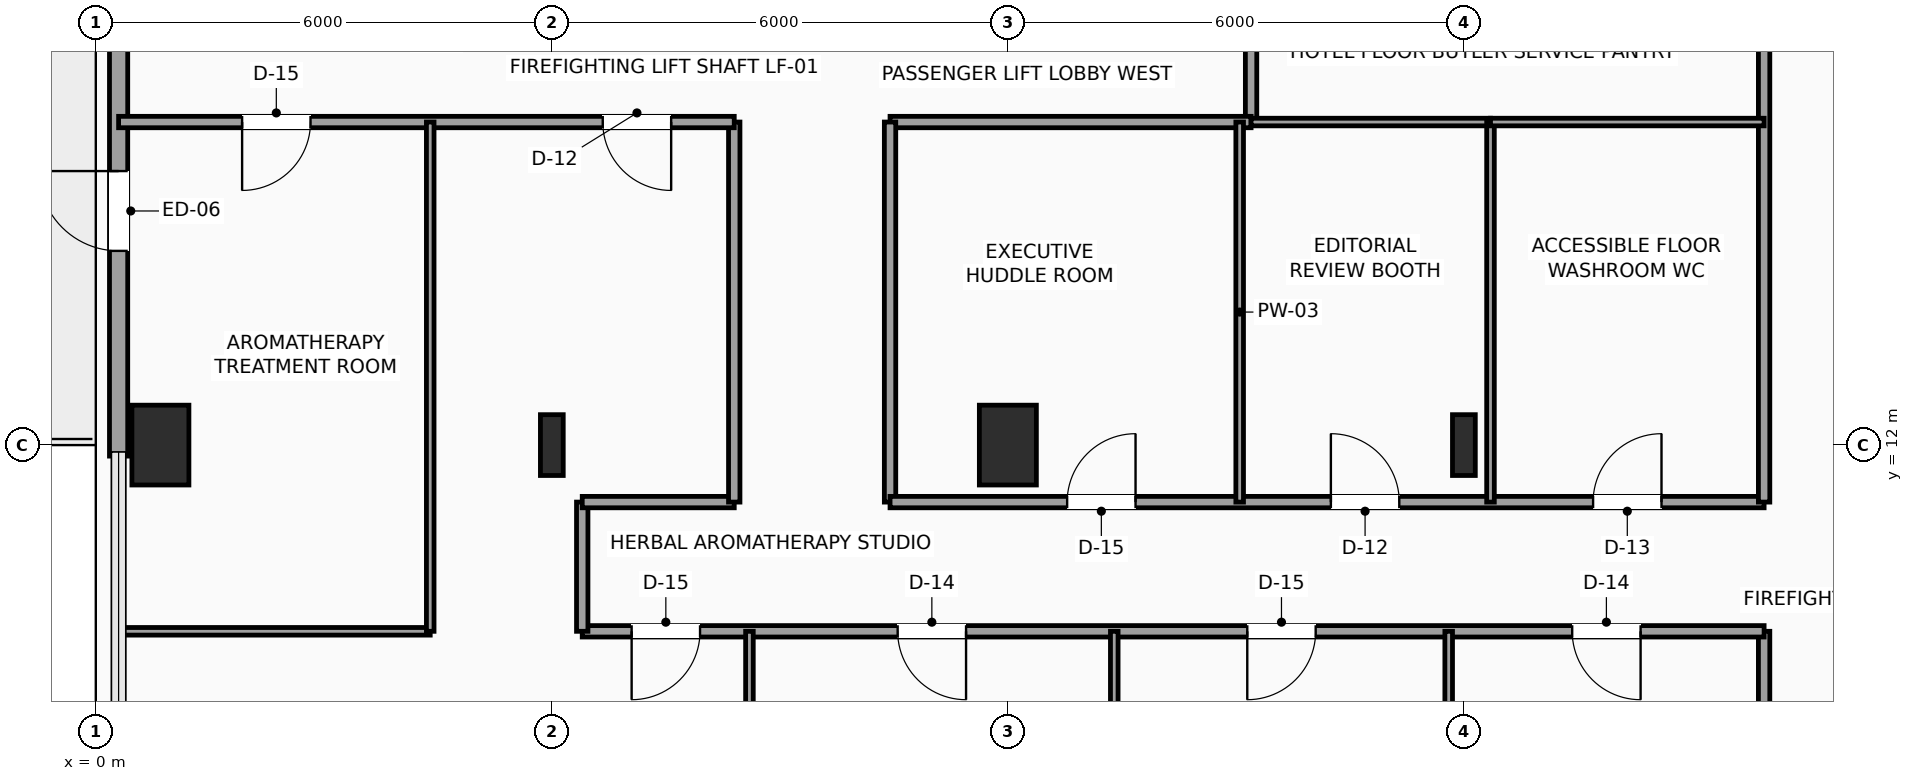
"""IFC4 building model, lengths in metres.
Left out: names, types, materials, properties, quantities, classifications, styles, units other than length and angle.
Written with IfcOpenShell. Run it as: python <this file> out.ifc"""

import sys

from ifc_helpers import new_model, si_unit, direction, frame, frame_2d, origin, origin_2d, place, context, subcontext, project, spatial, rectangle, i_section, extrude, element, fill, save


model = new_model("IFC4")
c1 = context("Model", 3, precision=1e-05, world=origin(), true_north=direction((0.0, 1.0)))
c2 = subcontext(c1, "Body", "Model", "MODEL_VIEW")
j1 = project(units=[si_unit("LENGTHUNIT", "METRE"), si_unit("PLANEANGLEUNIT", "RADIAN")], contexts=[c1])
p1 = place(None, origin())
s1 = spatial("IfcSite", under=j1, at=p1, CompositionType="ELEMENT")
p2 = place(p1, origin())
s2 = spatial("IfcBuilding", under=s1, at=p2, CompositionType="ELEMENT")
p3 = place(p2, frame((0.0, 0.0, 191.7)))
s3 = spatial("IfcBuildingStorey", under=s2, at=p3, CompositionType="ELEMENT", Elevation=191.7)
p4 = place(p3, frame((0.85, 12.0, 0.0), z_axis=(0.0, 0.0, 1.0), x_axis=(1.0, 0.0, 0.0)))
e1 = element("IfcColumn", 1, at=p4, inside=s3, PredefinedType="COLUMN", context=c2, shape_type="SweptSolid", body=[
    extrude(rectangle(XDim=0.75, YDim=1.05, at=origin_2d()), origin(), (0.0, 0.0, 1.0), 3.75),
])
p5 = place(p3, frame((6.0, 12.0, 0.0), z_axis=(0.0, 0.0, 1.0), x_axis=(1.0, 0.0, 0.0)))
e2 = element("IfcColumn", 2, at=p5, inside=s3, PredefinedType="COLUMN", context=c2, shape_type="SweptSolid", body=[
    extrude(i_section(OverallWidth=0.3, OverallDepth=0.8, WebThickness=0.018, FlangeThickness=0.033, FilletRadius=0.03, at=origin_2d()), origin(), (0.0, 0.0, 1.0), 3.75),
])
p6 = place(p3, frame((12.0, 12.0, 0.0), z_axis=(0.0, 0.0, 1.0), x_axis=(1.0, 0.0, 0.0)))
e3 = element("IfcColumn", 3, at=p6, inside=s3, PredefinedType="COLUMN", context=c2, shape_type="SweptSolid", body=[
    extrude(rectangle(XDim=0.75, YDim=1.05, at=origin_2d()), origin(), (0.0, 0.0, 1.0), 3.75),
])
p7 = place(p3, frame((18.0, 12.0, 0.0), z_axis=(0.0, 0.0, 1.0), x_axis=(1.0, 0.0, 0.0)))
e4 = element("IfcColumn", 4, at=p7, inside=s3, PredefinedType="COLUMN", context=c2, shape_type="SweptSolid", body=[
    extrude(i_section(OverallWidth=0.3, OverallDepth=0.8, WebThickness=0.018, FlangeThickness=0.033, FilletRadius=0.03, at=origin_2d()), origin(), (0.0, 0.0, 1.0), 3.75),
])
p8 = place(p3, frame((0.3, 11.855, 0.0), z_axis=(0.0, 0.0, 1.0), x_axis=(0.0, 1.0, 0.0)))
e5 = element("IfcWall", 5, at=p8, inside=s3, PredefinedType="SOLIDWALL", context=c2, shape_type="SweptSolid", body=[
    extrude(rectangle(XDim=9.29, YDim=0.24, at=frame_2d((4.645, 0.0))), origin(), (0.0, 0.0, 1.0), 3.54),
])
p9 = place(p8, frame((2.7, 0.0, 0.0)))
e6 = element("IfcOpeningElement", 6, at=p9, cuts=e5, PredefinedType="OPENING", context=c2, shape_type="SweptSolid", body=[
    extrude(rectangle(XDim=1.05, YDim=2.2, at=frame_2d((0.525, 1.1))), frame((0.0, 0.13, 0.0), z_axis=(0.0, -1.0, 0.0), x_axis=(1.0, 0.0, 0.0)), (0.0, 0.0, 1.0), 0.26),
])
p10 = place(p3, frame((21.95, 5.8, 0.0), z_axis=(0.0, 0.0, 1.0), x_axis=(0.0, 1.0, 0.0)))
e7 = element("IfcWall", 7, at=p10, inside=s3, PredefinedType="PARTITIONING", context=c2, shape_type="SweptSolid", body=[
    extrude(rectangle(XDim=3.75, YDim=0.15, at=frame_2d((1.875, 0.0))), origin(), (0.0, 0.0, 1.0), 3.54),
])
p11 = place(p3, frame((21.95, 9.55, 0.0), z_axis=(0.0, 0.0, 1.0), x_axis=(-1.0, 0.0, 0.0)))
e8 = element("IfcWall", 8, at=p11, inside=s3, PredefinedType="PARTITIONING", context=c2, shape_type="SweptSolid", body=[
    extrude(rectangle(XDim=15.55, YDim=0.15, at=frame_2d((7.775, 0.0))), origin(), (0.0, 0.0, 1.0), 3.54),
])
p12 = place(p11, frame((14.0, 0.0, 0.0)))
e9 = element("IfcOpeningElement", 9, at=p12, cuts=e8, PredefinedType="OPENING", context=c2, shape_type="SweptSolid", body=[
    extrude(rectangle(XDim=0.9, YDim=2.1, at=frame_2d((0.45, 1.05))), frame((0.0, 0.085, 0.0), z_axis=(0.0, -1.0, 0.0), x_axis=(1.0, 0.0, 0.0)), (0.0, 0.0, 1.0), 0.17),
])
p13 = place(p11, frame((10.5, 0.0, 0.0)))
e10 = element("IfcOpeningElement", 10, at=p13, cuts=e8, PredefinedType="OPENING", context=c2, shape_type="SweptSolid", body=[
    extrude(rectangle(XDim=0.9, YDim=2.1, at=frame_2d((0.45, 1.05))), frame((0.0, 0.085, 0.0), z_axis=(0.0, -1.0, 0.0), x_axis=(1.0, 0.0, 0.0)), (0.0, 0.0, 1.0), 0.17),
])
p14 = place(p11, frame((5.9, 0.0, 0.0)))
e11 = element("IfcOpeningElement", 11, at=p14, cuts=e8, PredefinedType="OPENING", context=c2, shape_type="SweptSolid", body=[
    extrude(rectangle(XDim=0.9, YDim=2.1, at=frame_2d((0.45, 1.05))), frame((0.0, 0.085, 0.0), z_axis=(0.0, -1.0, 0.0), x_axis=(1.0, 0.0, 0.0)), (0.0, 0.0, 1.0), 0.17),
])
p15 = place(p11, frame((1.625, 0.0, 0.0)))
e12 = element("IfcOpeningElement", 12, at=p15, cuts=e8, PredefinedType="OPENING", context=c2, shape_type="SweptSolid", body=[
    extrude(rectangle(XDim=0.9, YDim=2.1, at=frame_2d((0.45, 1.05))), frame((0.0, 0.085, 0.0), z_axis=(0.0, -1.0, 0.0), x_axis=(1.0, 0.0, 0.0)), (0.0, 0.0, 1.0), 0.17),
])
p16 = place(p3, frame((6.4, 9.55, 0.0), z_axis=(0.0, 0.0, 1.0), x_axis=(0.0, 1.0, 0.0)))
e13 = element("IfcWall", 13, at=p16, inside=s3, PredefinedType="PARTITIONING", context=c2, shape_type="SweptSolid", body=[
    extrude(rectangle(XDim=1.7, YDim=0.15, at=frame_2d((0.85, 0.0))), origin(), (0.0, 0.0, 1.0), 3.54),
])
p17 = place(p3, frame((6.4, 11.25, 0.0), z_axis=(0.0, 0.0, 1.0), x_axis=(1.0, 0.0, 0.0)))
e14 = element("IfcWall", 14, at=p17, inside=s3, PredefinedType="PARTITIONING", context=c2, shape_type="SweptSolid", body=[
    extrude(rectangle(XDim=2.0, YDim=0.15, at=frame_2d((1.0, 0.0))), origin(), (0.0, 0.0, 1.0), 3.54),
])
p18 = place(p3, frame((8.4, 11.25, 0.0), z_axis=(0.0, 0.0, 1.0), x_axis=(0.0, 1.0, 0.0)))
e15 = element("IfcWall", 15, at=p18, inside=s3, PredefinedType="PARTITIONING", context=c2, shape_type="SweptSolid", body=[
    extrude(rectangle(XDim=5.0, YDim=0.15, at=frame_2d((2.5, 0.0))), origin(), (0.0, 0.0, 1.0), 3.54),
])
p19 = place(p3, frame((8.4, 16.25, 0.0), z_axis=(0.0, 0.0, 1.0), x_axis=(-1.0, 0.0, 0.0)))
e16 = element("IfcWall", 16, at=p19, inside=s3, PredefinedType="PARTITIONING", context=c2, shape_type="SweptSolid", body=[
    extrude(rectangle(XDim=8.1, YDim=0.15, at=frame_2d((4.05, 0.0))), origin(), (0.0, 0.0, 1.0), 3.54),
])
p20 = place(p19, frame((5.575, 0.0, 0.0)))
e17 = element("IfcOpeningElement", 17, at=p20, cuts=e16, PredefinedType="OPENING", context=c2, shape_type="SweptSolid", body=[
    extrude(rectangle(XDim=0.9, YDim=2.1, at=frame_2d((0.45, 1.05))), frame((0.0, 0.085, 0.0), z_axis=(0.0, -1.0, 0.0), x_axis=(1.0, 0.0, 0.0)), (0.0, 0.0, 1.0), 0.17),
])
p21 = place(p19, frame((0.83, 0.0, 0.0)))
e18 = element("IfcOpeningElement", 18, at=p21, cuts=e16, PredefinedType="OPENING", context=c2, shape_type="SweptSolid", body=[
    extrude(rectangle(XDim=0.9, YDim=2.1, at=frame_2d((0.45, 1.05))), frame((0.0, 0.085, 0.0), z_axis=(0.0, -1.0, 0.0), x_axis=(1.0, 0.0, 0.0)), (0.0, 0.0, 1.0), 0.17),
])
p22 = place(p3, frame((15.2, 17.95, 0.0), z_axis=(0.0, 0.0, 1.0), x_axis=(0.0, -1.0, 0.0)))
e19 = element("IfcWall", 19, at=p22, inside=s3, PredefinedType="PARTITIONING", context=c2, shape_type="SweptSolid", body=[
    extrude(rectangle(XDim=1.7, YDim=0.15, at=frame_2d((0.85, 0.0))), origin(), (0.0, 0.0, 1.0), 3.54),
])
p23 = place(p3, frame((15.2, 16.25, 0.0), z_axis=(0.0, 0.0, 1.0), x_axis=(-1.0, 0.0, 0.0)))
e20 = element("IfcWall", 20, at=p23, inside=s3, PredefinedType="PARTITIONING", context=c2, shape_type="SweptSolid", body=[
    extrude(rectangle(XDim=4.75, YDim=0.15, at=frame_2d((2.375, 0.0))), origin(), (0.0, 0.0, 1.0), 3.54),
])
p24 = place(p3, frame((10.45, 16.25, 0.0), z_axis=(0.0, 0.0, 1.0), x_axis=(0.0, -1.0, 0.0)))
e21 = element("IfcWall", 21, at=p24, inside=s3, PredefinedType="PARTITIONING", context=c2, shape_type="SweptSolid", body=[
    extrude(rectangle(XDim=5.0, YDim=0.15, at=frame_2d((2.5, 0.0))), origin(), (0.0, 0.0, 1.0), 3.54),
])
p25 = place(p3, frame((10.45, 11.25, 0.0), z_axis=(0.0, 0.0, 1.0), x_axis=(1.0, 0.0, 0.0)))
e22 = element("IfcWall", 22, at=p25, inside=s3, PredefinedType="PARTITIONING", context=c2, shape_type="SweptSolid", body=[
    extrude(rectangle(XDim=11.5, YDim=0.15, at=frame_2d((5.75, 0.0))), origin(), (0.0, 0.0, 1.0), 3.54),
])
p26 = place(p25, frame((2.33, 0.0, 0.0)))
e23 = element("IfcOpeningElement", 23, at=p26, cuts=e22, PredefinedType="OPENING", context=c2, shape_type="SweptSolid", body=[
    extrude(rectangle(XDim=0.9, YDim=2.1, at=frame_2d((0.45, 1.05))), frame((0.0, 0.085, 0.0), z_axis=(0.0, -1.0, 0.0), x_axis=(1.0, 0.0, 0.0)), (0.0, 0.0, 1.0), 0.17),
])
p27 = place(p25, frame((5.8, 0.0, 0.0)))
e24 = element("IfcOpeningElement", 24, at=p27, cuts=e22, PredefinedType="OPENING", context=c2, shape_type="SweptSolid", body=[
    extrude(rectangle(XDim=0.9, YDim=2.1, at=frame_2d((0.45, 1.05))), frame((0.0, 0.085, 0.0), z_axis=(0.0, -1.0, 0.0), x_axis=(1.0, 0.0, 0.0)), (0.0, 0.0, 1.0), 0.17),
])
p28 = place(p25, frame((9.25, 0.0, 0.0)))
e25 = element("IfcOpeningElement", 25, at=p28, cuts=e22, PredefinedType="OPENING", context=c2, shape_type="SweptSolid", body=[
    extrude(rectangle(XDim=0.9, YDim=2.1, at=frame_2d((0.45, 1.05))), frame((0.0, 0.085, 0.0), z_axis=(0.0, -1.0, 0.0), x_axis=(1.0, 0.0, 0.0)), (0.0, 0.0, 1.0), 0.17),
])
p29 = place(p3, frame((21.95, 11.25, 0.0), z_axis=(0.0, 0.0, 1.0), x_axis=(0.0, 1.0, 0.0)))
e26 = element("IfcWall", 26, at=p29, inside=s3, PredefinedType="PARTITIONING", context=c2, shape_type="SweptSolid", body=[
    extrude(rectangle(XDim=19.0, YDim=0.15, at=frame_2d((9.5, 0.0))), origin(), (0.0, 0.0, 1.0), 3.54),
])
p30 = place(p3, frame((15.05, 11.25, 0.0), z_axis=(0.0, 0.0, 1.0), x_axis=(0.0, 1.0, 0.0)))
e27 = element("IfcWall", 27, at=p30, inside=s3, PredefinedType="PARTITIONING", context=c2, shape_type="SweptSolid", body=[
    extrude(rectangle(XDim=5.0, YDim=0.1, at=frame_2d((2.5, 0.0))), origin(), (0.0, 0.0, 1.0), 3.54),
])
p31 = place(p3, frame((15.2, 16.25, 0.0), z_axis=(0.0, 0.0, 1.0), x_axis=(1.0, 0.0, 0.0)))
e28 = element("IfcWall", 28, at=p31, inside=s3, PredefinedType="PARTITIONING", context=c2, shape_type="SweptSolid", body=[
    extrude(rectangle(XDim=3.15, YDim=0.1, at=frame_2d((1.575, 0.0))), origin(), (0.0, 0.0, 1.0), 3.54),
])
p32 = place(p3, frame((18.35, 11.25, 0.0), z_axis=(0.0, 0.0, 1.0), x_axis=(0.0, 1.0, 0.0)))
e29 = element("IfcWall", 29, at=p32, inside=s3, PredefinedType="PARTITIONING", context=c2, shape_type="SweptSolid", body=[
    extrude(rectangle(XDim=5.0, YDim=0.1, at=frame_2d((2.5, 0.0))), origin(), (0.0, 0.0, 1.0), 3.54),
])
p33 = place(p3, frame((18.35, 16.25, 0.0), z_axis=(0.0, 0.0, 1.0), x_axis=(1.0, 0.0, 0.0)))
e30 = element("IfcWall", 30, at=p33, inside=s3, PredefinedType="PARTITIONING", context=c2, shape_type="SweptSolid", body=[
    extrude(rectangle(XDim=3.6, YDim=0.1, at=frame_2d((1.8, 0.0))), origin(), (0.0, 0.0, 1.0), 3.54),
])
p34 = place(p3, frame((0.35, 0.35, 0.0), z_axis=(0.0, 0.0, 1.0), x_axis=(-0.005440038388, 0.999985202882, 0.0)))
e31 = element("IfcWall", 31, at=p34, inside=s3, PredefinedType="PARTITIONING", context=c2, shape_type="SweptSolid", body=[
    extrude(rectangle(XDim=9.2, YDim=0.1, at=frame_2d((4.6, 0.0))), origin(), (0.0, 0.0, 1.0), 3.54),
])
for number, where, z_axis, x_axis in (
    (32, (8.6, 0.3, 0.0), (0.0, 0.0, 1.0), (0.0, 1.0, 0.0)),
    (33, (13.4, 0.3, 0.0), (0.0, 0.0, 1.0), (0.0, 1.0, 0.0)),
):
    element("IfcWall", number, at=place(p3, frame(where, z_axis=z_axis, x_axis=x_axis)), inside=s3, PredefinedType="PARTITIONING", context=c2, shape_type="SweptSolid", body=[
        extrude(rectangle(XDim=9.25, YDim=0.1, at=frame_2d((4.625, 0.0))), origin(), (0.0, 0.0, 1.0), 3.54),
    ])
p35 = place(p3, frame((17.8, 0.3, 0.0), z_axis=(0.0, 0.0, 1.0), x_axis=(0.0, 1.0, 0.0)))
e34 = element("IfcWall", 34, at=p35, inside=s3, PredefinedType="PARTITIONING", context=c2, shape_type="SweptSolid", body=[
    extrude(rectangle(XDim=9.25, YDim=0.1, at=frame_2d((4.625, 0.0))), origin(), (0.0, 0.0, 1.0), 3.132),
])
p36 = place(p3, frame((0.3, 9.55, 0.0), z_axis=(0.0, 0.0, 1.0), x_axis=(1.0, 0.0, 0.0)))
e35 = element("IfcWall", 35, at=p36, inside=s3, PredefinedType="PARTITIONING", context=c2, shape_type="SweptSolid", body=[
    extrude(rectangle(XDim=4.1, YDim=0.1, at=frame_2d((2.05, 0.0))), origin(), (0.0, 0.0, 1.0), 3.54),
])
p37 = place(p3, frame((4.4, 9.55, 0.0), z_axis=(0.0, 0.0, 1.0), x_axis=(0.0, 1.0, 0.0)))
e36 = element("IfcWall", 36, at=p37, inside=s3, PredefinedType="PARTITIONING", context=c2, shape_type="SweptSolid", body=[
    extrude(rectangle(XDim=6.7, YDim=0.1, at=frame_2d((3.35, 0.0))), origin(), (0.0, 0.0, 1.0), 3.54),
])
p38 = place(p9, origin())
e37 = element("IfcDoor", 37, at=p38, inside=s3, OperationType="SINGLE_SWING_RIGHT", PredefinedType="DOOR", context=c2, shape_type="SweptSolid", body=[
    extrude(rectangle(XDim=1.05, YDim=2.2, at=frame_2d((0.525, 1.1))), frame((0.0, 0.025, 0.0), z_axis=(0.0, -1.0, 0.0), x_axis=(1.0, 0.0, 0.0)), (0.0, 0.0, 1.0), 0.05),
])
fill(e6, e37)
p39 = place(p12, origin())
e38 = element("IfcDoor", 38, at=p39, inside=s3, OperationType="SINGLE_SWING_RIGHT", PredefinedType="DOOR", context=c2, shape_type="SweptSolid", body=[
    extrude(rectangle(XDim=0.9, YDim=2.1, at=frame_2d((0.45, 1.05))), frame((0.0, 0.025, 0.0), z_axis=(0.0, -1.0, 0.0), x_axis=(1.0, 0.0, 0.0)), (0.0, 0.0, 1.0), 0.05),
])
fill(e9, e38)
p40 = place(p13, origin())
e39 = element("IfcDoor", 39, at=p40, inside=s3, OperationType="SINGLE_SWING_LEFT", PredefinedType="DOOR", context=c2, shape_type="SweptSolid", body=[
    extrude(rectangle(XDim=0.9, YDim=2.1, at=frame_2d((0.45, 1.05))), frame((0.0, 0.025, 0.0), z_axis=(0.0, -1.0, 0.0), x_axis=(1.0, 0.0, 0.0)), (0.0, 0.0, 1.0), 0.05),
])
fill(e10, e39)
p41 = place(p14, origin())
e40 = element("IfcDoor", 40, at=p41, inside=s3, OperationType="SINGLE_SWING_RIGHT", PredefinedType="DOOR", context=c2, shape_type="SweptSolid", body=[
    extrude(rectangle(XDim=0.9, YDim=2.1, at=frame_2d((0.45, 1.05))), frame((0.0, 0.025, 0.0), z_axis=(0.0, -1.0, 0.0), x_axis=(1.0, 0.0, 0.0)), (0.0, 0.0, 1.0), 0.05),
])
fill(e11, e40)
p42 = place(p15, origin())
e41 = element("IfcDoor", 41, at=p42, inside=s3, OperationType="SINGLE_SWING_LEFT", PredefinedType="DOOR", context=c2, shape_type="SweptSolid", body=[
    extrude(rectangle(XDim=0.9, YDim=2.1, at=frame_2d((0.45, 1.05))), frame((0.0, 0.025, 0.0), z_axis=(0.0, -1.0, 0.0), x_axis=(1.0, 0.0, 0.0)), (0.0, 0.0, 1.0), 0.05),
])
fill(e12, e41)
p43 = place(p20, origin())
e42 = element("IfcDoor", 42, at=p43, inside=s3, OperationType="SINGLE_SWING_RIGHT", PredefinedType="DOOR", context=c2, shape_type="SweptSolid", body=[
    extrude(rectangle(XDim=0.9, YDim=2.1, at=frame_2d((0.45, 1.05))), frame((0.0, 0.025, 0.0), z_axis=(0.0, -1.0, 0.0), x_axis=(1.0, 0.0, 0.0)), (0.0, 0.0, 1.0), 0.05),
])
fill(e17, e42)
p44 = place(p21, origin())
e43 = element("IfcDoor", 43, at=p44, inside=s3, OperationType="SINGLE_SWING_LEFT", PredefinedType="DOOR", context=c2, shape_type="SweptSolid", body=[
    extrude(rectangle(XDim=0.9, YDim=2.1, at=frame_2d((0.45, 1.05))), frame((0.0, 0.025, 0.0), z_axis=(0.0, -1.0, 0.0), x_axis=(1.0, 0.0, 0.0)), (0.0, 0.0, 1.0), 0.05),
])
fill(e18, e43)
p45 = place(p26, origin())
e44 = element("IfcDoor", 44, at=p45, inside=s3, OperationType="SINGLE_SWING_RIGHT", PredefinedType="DOOR", context=c2, shape_type="SweptSolid", body=[
    extrude(rectangle(XDim=0.9, YDim=2.1, at=frame_2d((0.45, 1.05))), frame((0.0, 0.025, 0.0), z_axis=(0.0, -1.0, 0.0), x_axis=(1.0, 0.0, 0.0)), (0.0, 0.0, 1.0), 0.05),
])
fill(e23, e44)
p46 = place(p27, origin())
e45 = element("IfcDoor", 45, at=p46, inside=s3, OperationType="SINGLE_SWING_LEFT", PredefinedType="DOOR", context=c2, shape_type="SweptSolid", body=[
    extrude(rectangle(XDim=0.9, YDim=2.1, at=frame_2d((0.45, 1.05))), frame((0.0, 0.025, 0.0), z_axis=(0.0, -1.0, 0.0), x_axis=(1.0, 0.0, 0.0)), (0.0, 0.0, 1.0), 0.05),
])
fill(e24, e45)
p47 = place(p28, origin())
e46 = element("IfcDoor", 46, at=p47, inside=s3, OperationType="SINGLE_SWING_RIGHT", PredefinedType="DOOR", context=c2, shape_type="SweptSolid", body=[
    extrude(rectangle(XDim=0.9, YDim=2.1, at=frame_2d((0.45, 1.05))), frame((0.0, 0.025, 0.0), z_axis=(0.0, -1.0, 0.0), x_axis=(1.0, 0.0, 0.0)), (0.0, 0.0, 1.0), 0.05),
])
fill(e25, e46)
save(model, sys.argv[1])
